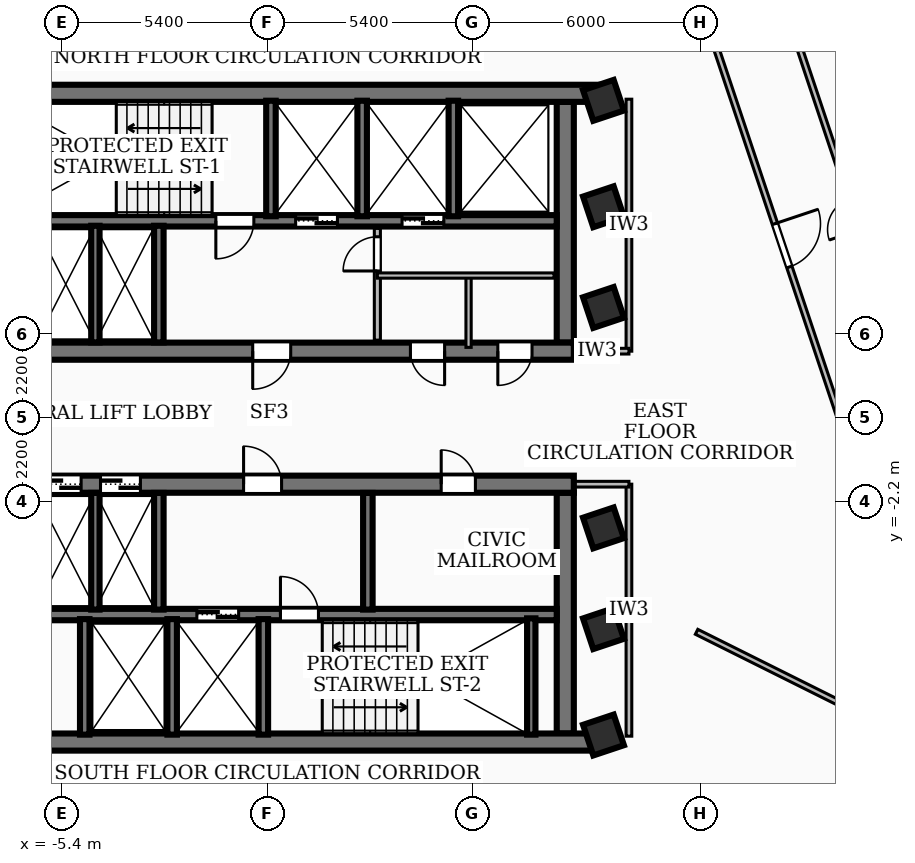
"""IFC4 building model, lengths in metres.
Left out: names, types, materials, properties, quantities, classifications, styles, units other than length and angle.
Written with IfcOpenShell. Run it as: python <this file> out.ifc"""

import sys

from ifc_helpers import new_model, si_unit, direction, frame, frame_2d, origin, origin_2d, place, context, subcontext, project, spatial, rectangle, extrude, element, fill, save


model = new_model("IFC4")
c1 = context("Model", 3, precision=1e-05, world=origin(), true_north=direction((0.0, 1.0)))
c2 = subcontext(c1, "Body", "Model", "MODEL_VIEW")
j1 = project(units=[si_unit("LENGTHUNIT", "METRE"), si_unit("PLANEANGLEUNIT", "RADIAN")], contexts=[c1])
p1 = place(None, origin())
s1 = spatial("IfcSite", under=j1, at=p1, CompositionType="ELEMENT")
p2 = place(p1, origin())
s2 = spatial("IfcBuilding", under=s1, at=p2, CompositionType="ELEMENT")
p3 = place(p2, frame((0.0, 0.0, 155.88)))
s3 = spatial("IfcBuildingStorey", under=s2, at=p3, CompositionType="ELEMENT", Elevation=155.88)
p4 = place(p3, frame((-8.78, 8.535, 0.0), z_axis=(0.0, 0.0, 1.0), x_axis=(1.0, 0.0, 0.0)))
e1 = element("IfcWall", 1, at=p4, inside=s3, PredefinedType="SHEAR", context=c2, shape_type="SweptSolid", body=[
    extrude(rectangle(XDim=17.56, YDim=0.45, at=frame_2d((8.78, 0.0))), origin(), (0.0, 0.0, 1.0), 3.34),
])
p5 = place(p3, frame((8.07, 1.75, 0.0), z_axis=(0.0, 0.0, 1.0), x_axis=(-1.0, 0.0, 0.0)))
e2 = element("IfcWall", 2, at=p5, inside=s3, PredefinedType="SHEAR", context=c2, shape_type="SweptSolid", body=[
    extrude(rectangle(XDim=16.14, YDim=0.45, at=frame_2d((8.07, 0.0))), origin(), (0.0, 0.0, 1.0), 3.34),
])
p6 = place(p5, frame((7.45, 0.0, 0.0)))
e3 = element("IfcOpeningElement", 3, at=p6, cuts=e2, PredefinedType="OPENING", context=c2, shape_type="SweptSolid", body=[
    extrude(rectangle(XDim=1.0, YDim=2.1, at=frame_2d((0.5, 1.05))), frame((0.0, 0.235, 0.0), z_axis=(0.0, -1.0, 0.0), x_axis=(1.0, 0.0, 0.0)), (0.0, 0.0, 1.0), 0.47),
])
p7 = place(p5, frame((3.4, 0.0, 0.0)))
e4 = element("IfcOpeningElement", 4, at=p7, cuts=e2, PredefinedType="OPENING", context=c2, shape_type="SweptSolid", body=[
    extrude(rectangle(XDim=0.9, YDim=2.06, at=frame_2d((0.45, 1.03))), frame((0.0, 0.235, 0.0), z_axis=(0.0, -1.0, 0.0), x_axis=(1.0, 0.0, 0.0)), (0.0, 0.0, 1.0), 0.47),
])
p8 = place(p5, frame((1.1, 0.0, 0.0)))
e5 = element("IfcOpeningElement", 5, at=p8, cuts=e2, PredefinedType="OPENING", context=c2, shape_type="SweptSolid", body=[
    extrude(rectangle(XDim=0.9, YDim=2.06, at=frame_2d((0.45, 1.03))), frame((0.0, 0.235, 0.0), z_axis=(0.0, -1.0, 0.0), x_axis=(1.0, 0.0, 0.0)), (0.0, 0.0, 1.0), 0.47),
])
p9 = place(p3, frame((7.845, 8.31, 0.0), z_axis=(0.0, 0.0, 1.0), x_axis=(0.0, -1.0, 0.0)))
e6 = element("IfcWall", 6, at=p9, inside=s3, PredefinedType="SHEAR", context=c2, shape_type="SweptSolid", body=[
    extrude(rectangle(XDim=6.335, YDim=0.45, at=frame_2d((3.167, 0.0))), origin(), (0.0, 0.0, 1.0), 3.34),
])
p10 = place(p3, frame((7.62, 5.18, 0.0), z_axis=(0.0, 0.0, 1.0), x_axis=(-1.0, 0.0, 0.0)))
e7 = element("IfcWall", 7, at=p10, inside=s3, PredefinedType="SOLIDWALL", context=c2, shape_type="SweptSolid", body=[
    extrude(rectangle(XDim=15.24, YDim=0.3, at=frame_2d((7.62, 0.0))), origin(), (0.0, 0.0, 1.0), 3.34),
])
p11 = place(p10, frame((5.77, 0.0, 0.0)))
e8 = element("IfcOpeningElement", 8, at=p11, cuts=e7, PredefinedType="OPENING", context=c2, shape_type="SweptSolid", body=[
    extrude(rectangle(XDim=1.1, YDim=2.15, at=frame_2d((0.55, 1.075))), frame((0.0, 0.16, 0.0), z_axis=(0.0, -1.0, 0.0), x_axis=(1.0, 0.0, 0.0)), (0.0, 0.0, 1.0), 0.32),
])
p12 = place(p10, frame((2.97, 0.0, 0.0)))
e9 = element("IfcOpeningElement", 9, at=p12, cuts=e7, PredefinedType="OPENING", context=c2, shape_type="SweptSolid", body=[
    extrude(rectangle(XDim=1.1, YDim=2.15, at=frame_2d((0.55, 1.075))), frame((0.0, 0.16, 0.0), z_axis=(0.0, -1.0, 0.0), x_axis=(1.0, 0.0, 0.0)), (0.0, 0.0, 1.0), 0.32),
])
p13 = place(p10, frame((7.97, 0.0, 0.0)))
e10 = element("IfcOpeningElement", 10, at=p13, cuts=e7, PredefinedType="OPENING", context=c2, shape_type="SweptSolid", body=[
    extrude(rectangle(XDim=1.0, YDim=2.1, at=frame_2d((0.5, 1.05))), frame((0.0, 0.16, 0.0), z_axis=(0.0, -1.0, 0.0), x_axis=(1.0, 0.0, 0.0)), (0.0, 0.0, 1.0), 0.32),
])
p14 = place(p3, frame((8.78, -8.535, 0.0), z_axis=(0.0, 0.0, 1.0), x_axis=(-1.0, 0.0, 0.0)))
e11 = element("IfcWall", 11, at=p14, inside=s3, PredefinedType="SHEAR", context=c2, shape_type="SweptSolid", body=[
    extrude(rectangle(XDim=17.56, YDim=0.45, at=frame_2d((8.78, 0.0))), origin(), (0.0, 0.0, 1.0), 3.34),
])
p15 = place(p3, frame((-8.07, -1.75, 0.0), z_axis=(0.0, 0.0, 1.0), x_axis=(1.0, 0.0, 0.0)))
e12 = element("IfcWall", 12, at=p15, inside=s3, PredefinedType="SHEAR", context=c2, shape_type="SweptSolid", body=[
    extrude(rectangle(XDim=16.14, YDim=0.45, at=frame_2d((8.07, 0.0))), origin(), (0.0, 0.0, 1.0), 3.34),
])
p16 = place(p15, frame((7.45, 0.0, 0.0)))
e13 = element("IfcOpeningElement", 13, at=p16, cuts=e12, PredefinedType="OPENING", context=c2, shape_type="SweptSolid", body=[
    extrude(rectangle(XDim=1.0, YDim=2.1, at=frame_2d((0.5, 1.05))), frame((0.0, 0.235, 0.0), z_axis=(0.0, -1.0, 0.0), x_axis=(1.0, 0.0, 0.0)), (0.0, 0.0, 1.0), 0.47),
])
p17 = place(p15, frame((12.65, 0.0, 0.0)))
e14 = element("IfcOpeningElement", 14, at=p17, cuts=e12, PredefinedType="OPENING", context=c2, shape_type="SweptSolid", body=[
    extrude(rectangle(XDim=0.9, YDim=2.06, at=frame_2d((0.45, 1.03))), frame((0.0, 0.235, 0.0), z_axis=(0.0, -1.0, 0.0), x_axis=(1.0, 0.0, 0.0)), (0.0, 0.0, 1.0), 0.47),
])
p18 = place(p15, frame((0.565, 0.0, 0.0)))
e15 = element("IfcOpeningElement", 15, at=p18, cuts=e12, PredefinedType="OPENING", context=c2, shape_type="SweptSolid", body=[
    extrude(rectangle(XDim=1.05, YDim=2.15, at=frame_2d((0.525, 1.075))), frame((0.0, 0.235, 0.0), z_axis=(0.0, -1.0, 0.0), x_axis=(1.0, 0.0, 0.0)), (0.0, 0.0, 1.0), 0.47),
])
p19 = place(p15, frame((2.125, 0.0, 0.0)))
e16 = element("IfcOpeningElement", 16, at=p19, cuts=e12, PredefinedType="OPENING", context=c2, shape_type="SweptSolid", body=[
    extrude(rectangle(XDim=1.05, YDim=2.15, at=frame_2d((0.525, 1.075))), frame((0.0, 0.235, 0.0), z_axis=(0.0, -1.0, 0.0), x_axis=(1.0, 0.0, 0.0)), (0.0, 0.0, 1.0), 0.47),
])
p20 = place(p15, frame((3.685, 0.0, 0.0)))
e17 = element("IfcOpeningElement", 17, at=p20, cuts=e12, PredefinedType="OPENING", context=c2, shape_type="SweptSolid", body=[
    extrude(rectangle(XDim=1.05, YDim=2.15, at=frame_2d((0.525, 1.075))), frame((0.0, 0.235, 0.0), z_axis=(0.0, -1.0, 0.0), x_axis=(1.0, 0.0, 0.0)), (0.0, 0.0, 1.0), 0.47),
])
p21 = place(p3, frame((7.845, -1.975, 0.0), z_axis=(0.0, 0.0, 1.0), x_axis=(0.0, -1.0, 0.0)))
e18 = element("IfcWall", 18, at=p21, inside=s3, PredefinedType="SHEAR", context=c2, shape_type="SweptSolid", body=[
    extrude(rectangle(XDim=6.335, YDim=0.45, at=frame_2d((3.167, 0.0))), origin(), (0.0, 0.0, 1.0), 3.34),
])
p22 = place(p3, frame((-7.62, -5.18, 0.0), z_axis=(0.0, 0.0, 1.0), x_axis=(1.0, 0.0, 0.0)))
e19 = element("IfcWall", 19, at=p22, inside=s3, PredefinedType="SOLIDWALL", context=c2, shape_type="SweptSolid", body=[
    extrude(rectangle(XDim=15.24, YDim=0.3, at=frame_2d((7.62, 0.0))), origin(), (0.0, 0.0, 1.0), 3.34),
])
p23 = place(p22, frame((5.77, 0.0, 0.0)))
e20 = element("IfcOpeningElement", 20, at=p23, cuts=e19, PredefinedType="OPENING", context=c2, shape_type="SweptSolid", body=[
    extrude(rectangle(XDim=1.1, YDim=2.15, at=frame_2d((0.55, 1.075))), frame((0.0, 0.16, 0.0), z_axis=(0.0, -1.0, 0.0), x_axis=(1.0, 0.0, 0.0)), (0.0, 0.0, 1.0), 0.32),
])
p24 = place(p22, frame((7.97, 0.0, 0.0)))
e21 = element("IfcOpeningElement", 21, at=p24, cuts=e19, PredefinedType="OPENING", context=c2, shape_type="SweptSolid", body=[
    extrude(rectangle(XDim=1.0, YDim=2.1, at=frame_2d((0.5, 1.05))), frame((0.0, 0.16, 0.0), z_axis=(0.0, -1.0, 0.0), x_axis=(1.0, 0.0, 0.0)), (0.0, 0.0, 1.0), 0.32),
])
p25 = place(p3, frame((6.95, -8.34, 0.0), z_axis=(0.0, 0.0, 1.0), x_axis=(0.0, 1.0, 0.0)))
e22 = element("IfcWall", 22, at=p25, inside=s3, PredefinedType="SOLIDWALL", context=c2, shape_type="SweptSolid", body=[
    extrude(rectangle(XDim=3.06, YDim=0.22, at=frame_2d((1.53, 0.0))), origin(), (0.0, 0.0, 1.0), 3.34),
])
for number, where, z_axis, x_axis in (
    (23, (0.1, 5.3, 0.0), (0.0, 0.0, 1.0), (0.0, 1.0, 0.0)),
    (24, (2.5, 5.3, 0.0), (0.0, 0.0, 1.0), (0.0, 1.0, 0.0)),
    (25, (4.9, 5.3, 0.0), (0.0, 0.0, 1.0), (0.0, 1.0, 0.0)),
):
    element("IfcWall", number, at=place(p3, frame(where, z_axis=z_axis, x_axis=x_axis)), inside=s3, PredefinedType="SOLIDWALL", context=c2, shape_type="SweptSolid", body=[
        extrude(rectangle(XDim=3.04, YDim=0.25, at=frame_2d((1.52, 0.0))), origin(), (0.0, 0.0, 1.0), 3.34),
    ])
p26 = place(p3, frame((-2.85, 1.98, 0.0), z_axis=(0.0, 0.0, 1.0), x_axis=(0.0, 1.0, 0.0)))
e26 = element("IfcWall", 26, at=p26, inside=s3, PredefinedType="SOLIDWALL", context=c2, shape_type="SweptSolid", body=[
    extrude(rectangle(XDim=3.07, YDim=0.25, at=frame_2d((1.535, 0.0))), origin(), (0.0, 0.0, 1.0), 3.34),
])
for number, where, z_axis, x_axis in (
    (27, (-0.1, -8.34, 0.0), (0.0, 0.0, 1.0), (0.0, 1.0, 0.0)),
    (28, (-2.5, -8.34, 0.0), (0.0, 0.0, 1.0), (0.0, 1.0, 0.0)),
    (29, (-4.8, -8.34, 0.0), (0.0, 0.0, 1.0), (0.0, 1.0, 0.0)),
):
    element("IfcWall", number, at=place(p3, frame(where, z_axis=z_axis, x_axis=x_axis)), inside=s3, PredefinedType="SOLIDWALL", context=c2, shape_type="SweptSolid", body=[
        extrude(rectangle(XDim=3.04, YDim=0.25, at=frame_2d((1.52, 0.0))), origin(), (0.0, 0.0, 1.0), 3.34),
    ])
for number, where, z_axis, x_axis in (
    (30, (-2.85, -5.05, 0.0), (0.0, 0.0, 1.0), (0.0, 1.0, 0.0)),
    (31, (2.65, -5.05, 0.0), (0.0, 0.0, 1.0), (0.0, 1.0, 0.0)),
):
    element("IfcWall", number, at=place(p3, frame(where, z_axis=z_axis, x_axis=x_axis)), inside=s3, PredefinedType="SOLIDWALL", context=c2, shape_type="SweptSolid", body=[
        extrude(rectangle(XDim=3.07, YDim=0.25, at=frame_2d((1.535, 0.0))), origin(), (0.0, 0.0, 1.0), 3.34),
    ])
for number, where, z_axis, x_axis in (
    (32, (-4.52, 1.98, 0.0), (0.0, 0.0, 1.0), (0.0, 1.0, 0.0)),
    (33, (-4.52, -5.05, 0.0), (0.0, 0.0, 1.0), (0.0, 1.0, 0.0)),
):
    element("IfcWall", number, at=place(p3, frame(where, z_axis=z_axis, x_axis=x_axis)), inside=s3, PredefinedType="SOLIDWALL", context=c2, shape_type="SweptSolid", body=[
        extrude(rectangle(XDim=3.07, YDim=0.22, at=frame_2d((1.535, 0.0))), origin(), (0.0, 0.0, 1.0), 3.34),
    ])
for number, where, z_axis, x_axis in (
    (34, (8.85, -5.55, 0.0), (0.0, 0.0, 1.0), (0.948, 0.317, 0.0)),
    (35, (8.85, -2.9, 0.0), (0.0, 0.0, 1.0), (0.948, 0.317, 0.0)),
    (36, (8.85, 2.9, 0.0), (0.0, 0.0, 1.0), (0.948, 0.317, 0.0)),
    (37, (8.85, 5.55, 0.0), (0.0, 0.0, 1.0), (0.948, 0.317, 0.0)),
    (38, (8.85, -8.35, 0.0), (0.0, 0.0, 1.0), (0.948, 0.317, 0.0)),
    (39, (8.85, 8.35, 0.0), (0.0, 0.0, 1.0), (0.948, 0.317, 0.0)),
):
    element("IfcColumn", number, at=place(p3, frame(where, z_axis=z_axis, x_axis=x_axis)), inside=s3, PredefinedType="COLUMN", context=c2, shape_type="SweptSolid", body=[
        extrude(rectangle(XDim=0.85, YDim=0.85, at=origin_2d()), origin(), (0.0, 0.0, 1.0), 3.6),
    ])
p27 = place(p3, frame((16.873, -9.581, 0.0), z_axis=(0.0, 0.0, 1.0), x_axis=(-0.94829606055, -0.317387116224, 0.0)))
e40 = element("IfcWall", 40, at=p27, inside=s3, PredefinedType="SOLIDWALL", context=c2, shape_type="SweptSolid", body=[
    extrude(rectangle(XDim=6.758, YDim=0.22, at=frame_2d((3.379, 0.0))), origin(), (0.0, 0.0, 1.0), 3.34),
])
p28 = place(p3, frame((2.9, 2.04, 0.0), z_axis=(0.0, 0.0, 1.0), x_axis=(0.0, 1.0, 0.0)))
e41 = element("IfcWall", 41, at=p28, inside=s3, PredefinedType="PARTITIONING", context=c2, shape_type="SweptSolid", body=[
    extrude(rectangle(XDim=2.94, YDim=0.16, at=frame_2d((1.47, 0.0))), origin(), (0.0, 0.0, 1.0), 2.57),
])
p29 = place(p28, frame((1.82, 0.0, 0.0)))
e42 = element("IfcOpeningElement", 42, at=p29, cuts=e41, PredefinedType="OPENING", context=c2, shape_type="SweptSolid", body=[
    extrude(rectangle(XDim=0.9, YDim=2.06, at=frame_2d((0.45, 1.03))), frame((0.0, 0.09, 0.0), z_axis=(0.0, -1.0, 0.0), x_axis=(1.0, 0.0, 0.0)), (0.0, 0.0, 1.0), 0.18),
])
p30 = place(p3, frame((2.9, 3.74, 0.0), z_axis=(0.0, 0.0, 1.0), x_axis=(1.0, 0.0, 0.0)))
e43 = element("IfcWall", 43, at=p30, inside=s3, PredefinedType="PARTITIONING", context=c2, shape_type="SweptSolid", body=[
    extrude(rectangle(XDim=4.65, YDim=0.138, at=frame_2d((2.325, 0.0))), origin(), (0.0, 0.0, 1.0), 3.34),
])
p31 = place(p3, frame((5.3, 1.85, 0.0), z_axis=(0.0, 0.0, 1.0), x_axis=(0.0, 1.0, 0.0)))
e44 = element("IfcWall", 44, at=p31, inside=s3, PredefinedType="PARTITIONING", context=c2, shape_type="SweptSolid", body=[
    extrude(rectangle(XDim=1.89, YDim=0.138, at=frame_2d((0.945, 0.0))), origin(), (0.0, 0.0, 1.0), 2.57),
])
p32 = place(p3, frame((9.52, 1.75, 0.0), z_axis=(0.0, 0.0, 1.0), x_axis=(0.0, 1.0, 0.0)))
e45 = element("IfcWall", 45, at=p32, inside=s3, PredefinedType="PARTITIONING", context=c2, shape_type="SweptSolid", body=[
    extrude(rectangle(XDim=6.63, YDim=0.15, at=frame_2d((3.315, 0.0))), origin(), (0.0, 0.0, 1.0), 2.644),
])
p33 = place(p3, frame((7.85, 1.75, 0.0), z_axis=(0.0, 0.0, 1.0), x_axis=(1.0, 0.0, 0.0)))
e46 = element("IfcWall", 46, at=p33, inside=s3, PredefinedType="PARTITIONING", context=c2, shape_type="SweptSolid", body=[
    extrude(rectangle(XDim=1.67, YDim=0.15, at=frame_2d((0.835, 0.0))), origin(), (0.0, 0.0, 1.0), 2.57),
])
p34 = place(p3, frame((9.52, -8.38, 0.0), z_axis=(0.0, 0.0, 1.0), x_axis=(0.0, 1.0, 0.0)))
e47 = element("IfcWall", 47, at=p34, inside=s3, PredefinedType="PARTITIONING", context=c2, shape_type="SweptSolid", body=[
    extrude(rectangle(XDim=6.63, YDim=0.15, at=frame_2d((3.315, 0.0))), origin(), (0.0, 0.0, 1.0), 3.34),
])
p35 = place(p3, frame((7.85, -1.75, 0.0), z_axis=(0.0, 0.0, 1.0), x_axis=(1.0, 0.0, 0.0)))
e48 = element("IfcWall", 48, at=p35, inside=s3, PredefinedType="PARTITIONING", context=c2, shape_type="SweptSolid", body=[
    extrude(rectangle(XDim=1.67, YDim=0.15, at=frame_2d((0.835, 0.0))), origin(), (0.0, 0.0, 1.0), 2.57),
])
p36 = place(p3, frame((11.3, -5.634, 0.0), z_axis=(0.0, 0.0, 1.0), x_axis=(0.894904738475, -0.446257222972, 0.0)))
e49 = element("IfcWall", 49, at=p36, inside=s3, PredefinedType="PARTITIONING", context=c2, shape_type="SweptSolid", body=[
    extrude(rectangle(XDim=7.048, YDim=0.145, at=frame_2d((3.524, 0.0))), origin(), (0.0, 0.0, 1.0), 3.34),
])
p37 = place(p3, frame((10.372, 14.037, 0.0), z_axis=(0.0, 0.0, 1.0), x_axis=(0.317298382655, -0.94832575435, 0.0)))
e50 = element("IfcWall", 50, at=p37, inside=s3, PredefinedType="PARTITIONING", context=c2, shape_type="SweptSolid", body=[
    extrude(rectangle(XDim=20.041, YDim=0.145, at=frame_2d((10.021, 0.0))), origin(), (0.0, 0.0, 1.0), 2.644),
])
p38 = place(p37, frame((9.42, 0.0, 0.0)))
e51 = element("IfcOpeningElement", 51, at=p38, cuts=e50, PredefinedType="OPENING", context=c2, shape_type="SweptSolid", body=[
    extrude(rectangle(XDim=1.2, YDim=2.1, at=frame_2d((0.6, 1.05))), frame((0.0, 0.083, 0.0), z_axis=(0.0, -1.0, 0.0), x_axis=(1.0, 0.0, 0.0)), (0.0, 0.0, 1.0), 0.165),
])
p39 = place(p3, frame((17.496, -0.7, 0.0), z_axis=(0.0, 0.0, 1.0), x_axis=(-0.317299961245, 0.948325226172, 0.0)))
e52 = element("IfcWall", 52, at=p39, inside=s3, PredefinedType="PARTITIONING", context=c2, shape_type="SweptSolid", body=[
    extrude(rectangle(XDim=12.43, YDim=0.145, at=frame_2d((6.215, 0.0))), origin(), (0.0, 0.0, 1.0), 2.644),
])
p40 = place(p39, frame((4.515, 0.0, 0.0)))
e53 = element("IfcOpeningElement", 53, at=p40, cuts=e52, PredefinedType="OPENING", context=c2, shape_type="SweptSolid", body=[
    extrude(rectangle(XDim=0.86, YDim=2.04, at=frame_2d((0.43, 1.02))), frame((0.0, 0.083, 0.0), z_axis=(0.0, -1.0, 0.0), x_axis=(1.0, 0.0, 0.0)), (0.0, 0.0, 1.0), 0.165),
])
p41 = place(p39, frame((5.955, 0.0, 0.0)))
e54 = element("IfcOpeningElement", 54, at=p41, cuts=e52, PredefinedType="OPENING", context=c2, shape_type="SweptSolid", body=[
    extrude(rectangle(XDim=0.86, YDim=2.04, at=frame_2d((0.43, 1.02))), frame((0.0, 0.083, 0.0), z_axis=(0.0, -1.0, 0.0), x_axis=(1.0, 0.0, 0.0)), (0.0, 0.0, 1.0), 0.165),
])
p42 = place(p6, origin())
e55 = element("IfcDoor", 55, at=p42, inside=s3, OperationType="SINGLE_SWING_RIGHT", PredefinedType="DOOR", context=c2, shape_type="SweptSolid", body=[
    extrude(rectangle(XDim=1.0, YDim=2.1, at=frame_2d((0.5, 1.05))), frame((0.0, 0.025, 0.0), z_axis=(0.0, -1.0, 0.0), x_axis=(1.0, 0.0, 0.0)), (0.0, 0.0, 1.0), 0.05),
])
fill(e3, e55)
p43 = place(p16, origin())
e56 = element("IfcDoor", 56, at=p43, inside=s3, OperationType="SINGLE_SWING_LEFT", PredefinedType="DOOR", context=c2, shape_type="SweptSolid", body=[
    extrude(rectangle(XDim=1.0, YDim=2.1, at=frame_2d((0.5, 1.05))), frame((0.0, 0.025, 0.0), z_axis=(0.0, -1.0, 0.0), x_axis=(1.0, 0.0, 0.0)), (0.0, 0.0, 1.0), 0.05),
])
fill(e13, e56)
p44 = place(p11, origin())
e57 = element("IfcDoor", 57, at=p44, inside=s3, OperationType="DOUBLE_DOOR_SLIDING", PredefinedType="DOOR", context=c2, shape_type="SweptSolid", body=[
    extrude(rectangle(XDim=1.1, YDim=2.15, at=frame_2d((0.55, 1.075))), frame((0.0, 0.025, 0.0), z_axis=(0.0, -1.0, 0.0), x_axis=(1.0, 0.0, 0.0)), (0.0, 0.0, 1.0), 0.05),
])
fill(e8, e57)
p45 = place(p12, origin())
e58 = element("IfcDoor", 58, at=p45, inside=s3, OperationType="DOUBLE_DOOR_SLIDING", PredefinedType="DOOR", context=c2, shape_type="SweptSolid", body=[
    extrude(rectangle(XDim=1.1, YDim=2.15, at=frame_2d((0.55, 1.075))), frame((0.0, 0.025, 0.0), z_axis=(0.0, -1.0, 0.0), x_axis=(1.0, 0.0, 0.0)), (0.0, 0.0, 1.0), 0.05),
])
fill(e9, e58)
p46 = place(p13, origin())
e59 = element("IfcDoor", 59, at=p46, inside=s3, OperationType="SINGLE_SWING_RIGHT", PredefinedType="DOOR", context=c2, shape_type="SweptSolid", body=[
    extrude(rectangle(XDim=1.0, YDim=2.1, at=frame_2d((0.5, 1.05))), frame((0.0, 0.025, 0.0), z_axis=(0.0, -1.0, 0.0), x_axis=(1.0, 0.0, 0.0)), (0.0, 0.0, 1.0), 0.05),
])
fill(e10, e59)
p47 = place(p23, origin())
e60 = element("IfcDoor", 60, at=p47, inside=s3, OperationType="DOUBLE_DOOR_SLIDING", PredefinedType="DOOR", context=c2, shape_type="SweptSolid", body=[
    extrude(rectangle(XDim=1.1, YDim=2.15, at=frame_2d((0.55, 1.075))), frame((0.0, 0.025, 0.0), z_axis=(0.0, -1.0, 0.0), x_axis=(1.0, 0.0, 0.0)), (0.0, 0.0, 1.0), 0.05),
])
fill(e20, e60)
p48 = place(p24, origin())
e61 = element("IfcDoor", 61, at=p48, inside=s3, OperationType="SINGLE_SWING_LEFT", PredefinedType="DOOR", context=c2, shape_type="SweptSolid", body=[
    extrude(rectangle(XDim=1.0, YDim=2.1, at=frame_2d((0.5, 1.05))), frame((0.0, 0.025, 0.0), z_axis=(0.0, -1.0, 0.0), x_axis=(1.0, 0.0, 0.0)), (0.0, 0.0, 1.0), 0.05),
])
fill(e21, e61)
p49 = place(p17, origin())
e62 = element("IfcDoor", 62, at=p49, inside=s3, OperationType="SINGLE_SWING_LEFT", PredefinedType="DOOR", context=c2, shape_type="SweptSolid", body=[
    extrude(rectangle(XDim=0.9, YDim=2.06, at=frame_2d((0.45, 1.03))), frame((0.0, 0.025, 0.0), z_axis=(0.0, -1.0, 0.0), x_axis=(1.0, 0.0, 0.0)), (0.0, 0.0, 1.0), 0.05),
])
fill(e14, e62)
p50 = place(p19, origin())
e63 = element("IfcDoor", 63, at=p50, inside=s3, OperationType="DOUBLE_DOOR_SLIDING", PredefinedType="DOOR", context=c2, shape_type="SweptSolid", body=[
    extrude(rectangle(XDim=1.05, YDim=2.15, at=frame_2d((0.525, 1.075))), frame((0.0, 0.025, 0.0), z_axis=(0.0, -1.0, 0.0), x_axis=(1.0, 0.0, 0.0)), (0.0, 0.0, 1.0), 0.05),
])
fill(e16, e63)
p51 = place(p20, origin())
e64 = element("IfcDoor", 64, at=p51, inside=s3, OperationType="DOUBLE_DOOR_SLIDING", PredefinedType="DOOR", context=c2, shape_type="SweptSolid", body=[
    extrude(rectangle(XDim=1.05, YDim=2.15, at=frame_2d((0.525, 1.075))), frame((0.0, 0.025, 0.0), z_axis=(0.0, -1.0, 0.0), x_axis=(1.0, 0.0, 0.0)), (0.0, 0.0, 1.0), 0.05),
])
fill(e17, e64)
p52 = place(p7, origin())
e65 = element("IfcDoor", 65, at=p52, inside=s3, OperationType="SINGLE_SWING_LEFT", PredefinedType="DOOR", context=c2, shape_type="SweptSolid", body=[
    extrude(rectangle(XDim=0.9, YDim=2.06, at=frame_2d((0.45, 1.03))), frame((0.0, 0.025, 0.0), z_axis=(0.0, -1.0, 0.0), x_axis=(1.0, 0.0, 0.0)), (0.0, 0.0, 1.0), 0.05),
])
fill(e4, e65)
p53 = place(p8, origin())
e66 = element("IfcDoor", 66, at=p53, inside=s3, OperationType="SINGLE_SWING_RIGHT", PredefinedType="DOOR", context=c2, shape_type="SweptSolid", body=[
    extrude(rectangle(XDim=0.9, YDim=2.06, at=frame_2d((0.45, 1.03))), frame((0.0, 0.025, 0.0), z_axis=(0.0, -1.0, 0.0), x_axis=(1.0, 0.0, 0.0)), (0.0, 0.0, 1.0), 0.05),
])
fill(e5, e66)
p54 = place(p29, origin())
e67 = element("IfcDoor", 67, at=p54, inside=s3, OperationType="SINGLE_SWING_LEFT", PredefinedType="DOOR", context=c2, shape_type="SweptSolid", body=[
    extrude(rectangle(XDim=0.9, YDim=2.06, at=frame_2d((0.45, 1.03))), frame((0.0, 0.025, 0.0), z_axis=(0.0, -1.0, 0.0), x_axis=(1.0, 0.0, 0.0)), (0.0, 0.0, 1.0), 0.05),
])
fill(e42, e67)
p55 = place(p38, origin())
e68 = element("IfcDoor", 68, at=p55, inside=s3, OperationType="SINGLE_SWING_LEFT", PredefinedType="DOOR", context=c2, shape_type="SweptSolid", body=[
    extrude(rectangle(XDim=1.2, YDim=2.1, at=frame_2d((0.6, 1.05))), frame((0.0, 0.025, 0.0), z_axis=(0.0, -1.0, 0.0), x_axis=(1.0, 0.0, 0.0)), (0.0, 0.0, 1.0), 0.05),
])
fill(e51, e68)
save(model, sys.argv[1])
